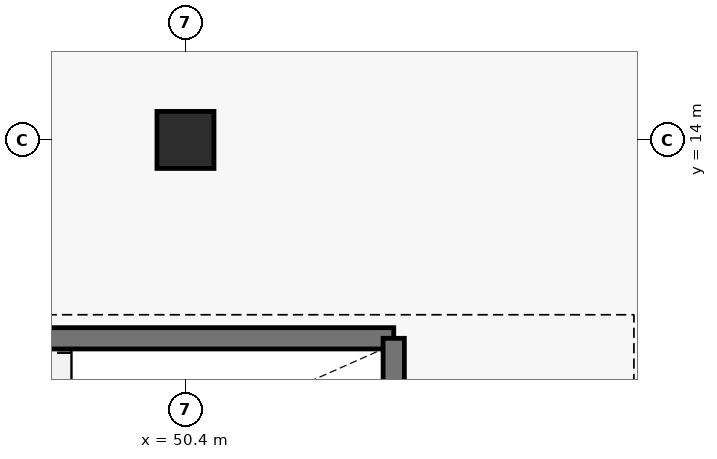
"""IFC4 building model, lengths in metres.
Left out: names, types, materials, properties, quantities, classifications, styles, units other than length and angle.
Written with IfcOpenShell. Run it as: python <this file> out.ifc"""

import sys

from ifc_helpers import new_model, si_unit, direction, frame, frame_2d, origin, origin_2d, place, context, subcontext, project, spatial, rectangle, extrude, element, save


model = new_model("IFC4")
c1 = context("Model", 3, precision=1e-05, world=origin(), true_north=direction((0.0, 1.0)))
c2 = subcontext(c1, "Body", "Model", "MODEL_VIEW")
j1 = project(units=[si_unit("LENGTHUNIT", "METRE"), si_unit("PLANEANGLEUNIT", "RADIAN")], contexts=[c1])
p1 = place(None, origin())
s1 = spatial("IfcSite", under=j1, at=p1, CompositionType="ELEMENT")
p2 = place(p1, origin())
s2 = spatial("IfcBuilding", under=s1, at=p2, CompositionType="ELEMENT")
p3 = place(p2, frame((0.0, 0.0, 9.6)))
s3 = spatial("IfcBuildingStorey", under=s2, at=p3, CompositionType="ELEMENT", Elevation=9.6)
p4 = place(p3, frame((50.4, 14.0, 0.0), z_axis=(0.0, 0.0, 1.0), x_axis=(1.0, 0.0, 0.0)))
e1 = element("IfcColumn", 1, at=p4, inside=s3, PredefinedType="COLUMN", context=c2, shape_type="SweptSolid", body=[
    extrude(rectangle(XDim=0.75, YDim=0.75, at=origin_2d()), origin(), (0.0, 0.0, 1.0), 3.52),
])
p5 = place(p3, frame((44.26, 11.39, 0.0), z_axis=(0.0, 0.0, 1.0), x_axis=(1.0, 0.0, 0.0)))
e2 = element("IfcWall", 2, at=p5, inside=s3, PredefinedType="SHEAR", context=c2, shape_type="SweptSolid", body=[
    extrude(rectangle(XDim=8.88, YDim=0.28, at=frame_2d((4.44, 0.0))), origin(), (0.0, 0.0, 1.0), 3.52),
])
p6 = place(p3, frame((53.14, 7.96, 0.0), z_axis=(0.0, 0.0, 1.0), x_axis=(0.0, 1.0, 0.0)))
e3 = element("IfcWall", 3, at=p6, inside=s3, PredefinedType="SHEAR", context=c2, shape_type="SweptSolid", body=[
    extrude(rectangle(XDim=3.43, YDim=0.28, at=frame_2d((1.715, 0.0))), origin(), (0.0, 0.0, 1.0), 3.52),
])
save(model, sys.argv[1])
